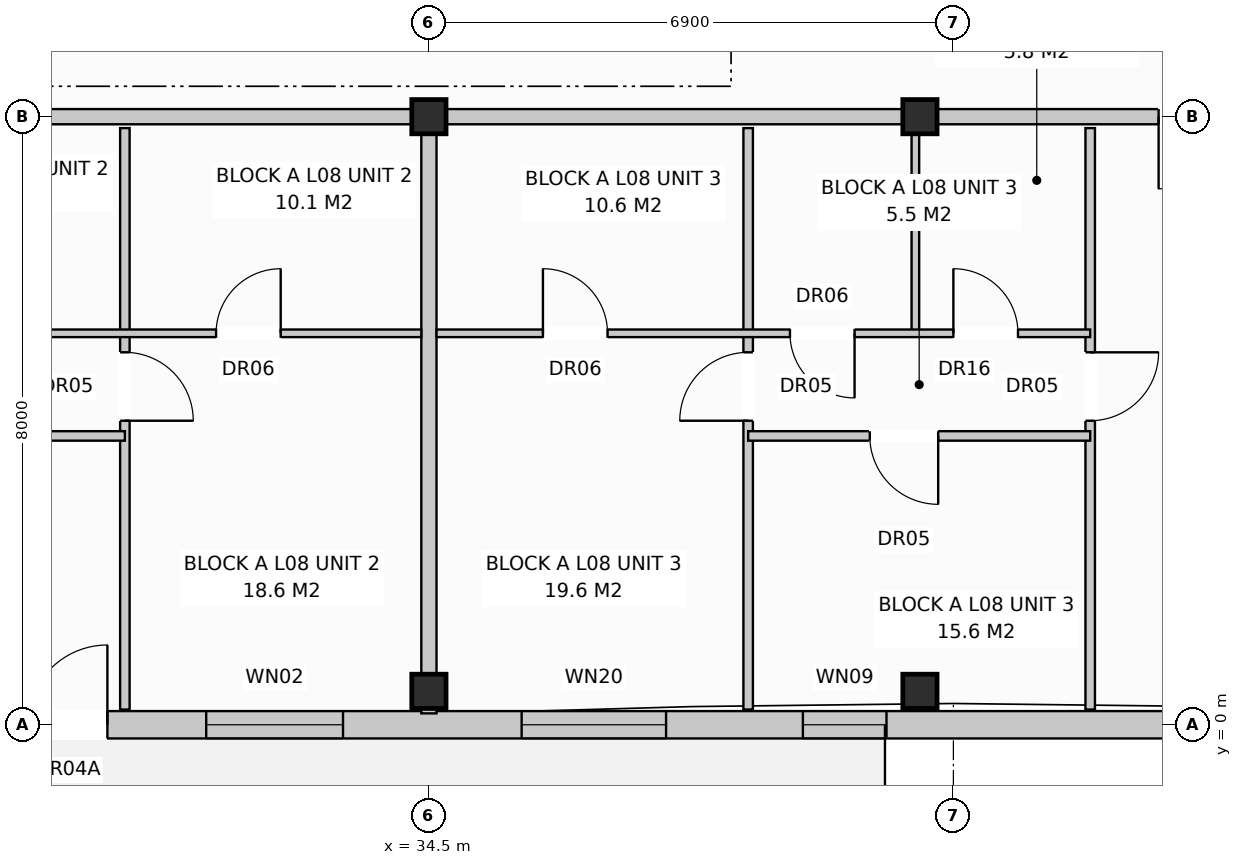
"""IFC4 building model, lengths in metres.
Left out: names, types, materials, properties, quantities, classifications, styles, units other than length and angle.
Written with IfcOpenShell. Run it as: python <this file> out.ifc"""

import sys

from ifc_helpers import new_model, si_unit, direction, frame, frame_2d, origin, origin_with_axes, origin_2d, place, context, subcontext, project, spatial, rectangle, extrude, element, fill, save


model = new_model("IFC4")
c1 = context("Model", 3, precision=1e-05, world=origin(), true_north=direction((0.0, 1.0)))
c2 = subcontext(c1, "Body", "Model", "MODEL_VIEW")
j1 = project(units=[si_unit("LENGTHUNIT", "METRE"), si_unit("PLANEANGLEUNIT", "RADIAN")], contexts=[c1])
p1 = place(None, origin())
s1 = spatial("IfcSite", under=j1, at=p1, CompositionType="ELEMENT")
p2 = place(p1, origin())
s2 = spatial("IfcBuilding", under=s1, at=p2, CompositionType="ELEMENT")
p3 = place(p2, frame((0.0, 0.0, 27.2)))
s3 = spatial("IfcBuildingStorey", under=s2, at=p3, CompositionType="ELEMENT", Elevation=27.2)
for number, where, z_axis, x_axis in (
    (1, (34.5, 0.44, 0.0), (0.0, 0.0, 1.0), (1.0, 0.0, 0.0)),
    (2, (34.5, 8.0, 0.0), (0.0, 0.0, 1.0), (1.0, 0.0, 0.0)),
    (3, (40.96, 0.44, 0.0), (0.0, 0.0, 1.0), (1.0, 0.0, 0.0)),
    (4, (40.96, 8.0, 0.0), (0.0, 0.0, 1.0), (1.0, 0.0, 0.0)),
):
    element("IfcColumn", number, at=place(p3, frame(where, z_axis=z_axis, x_axis=x_axis)), inside=s3, PredefinedType="COLUMN", context=c2, shape_type="SweptSolid", body=[
        extrude(rectangle(XDim=0.45, YDim=0.45, at=origin_2d()), origin(), (0.0, 0.0, 1.0), 3.2),
    ])
p4 = place(p3, frame((0.17, 0.0, 0.0), z_axis=(0.0, 0.0, 1.0), x_axis=(1.0, 0.0, 0.0)))
e5 = element("IfcWall", 5, at=p4, inside=s3, PredefinedType="STANDARD", context=c2, shape_type="SweptSolid", body=[
    extrude(rectangle(XDim=54.86, YDim=0.36, at=frame_2d((27.43, 0.0))), origin(), (0.0, 0.0, 1.0), 2.96),
])
p5 = place(p4, frame((3.75, 0.0, 0.0)))
e6 = element("IfcOpeningElement", 6, at=p5, cuts=e5, PredefinedType="OPENING", context=c2, shape_type="SweptSolid", body=[
    extrude(rectangle(XDim=1.05, YDim=2.12, at=frame_2d((0.525, 1.06))), frame((0.0, 0.192, 0.0), z_axis=(0.0, -1.0, 0.0), x_axis=(1.0, 0.0, 0.0)), (0.0, 0.0, 1.0), 0.384),
])
p6 = place(p4, frame((18.65, 0.0, 0.0)))
e7 = element("IfcOpeningElement", 7, at=p6, cuts=e5, PredefinedType="OPENING", context=c2, shape_type="SweptSolid", body=[
    extrude(rectangle(XDim=1.05, YDim=2.12, at=frame_2d((0.525, 1.06))), frame((0.0, 0.192, 0.0), z_axis=(0.0, -1.0, 0.0), x_axis=(1.0, 0.0, 0.0)), (0.0, 0.0, 1.0), 0.384),
])
p7 = place(p4, frame((29.05, 0.0, 0.0)))
e8 = element("IfcOpeningElement", 8, at=p7, cuts=e5, PredefinedType="OPENING", context=c2, shape_type="SweptSolid", body=[
    extrude(rectangle(XDim=1.05, YDim=2.12, at=frame_2d((0.525, 1.06))), frame((0.0, 0.192, 0.0), z_axis=(0.0, -1.0, 0.0), x_axis=(1.0, 0.0, 0.0)), (0.0, 0.0, 1.0), 0.384),
])
p8 = place(p4, frame((46.447, 0.0, 0.0)))
e9 = element("IfcOpeningElement", 9, at=p8, cuts=e5, PredefinedType="OPENING", context=c2, shape_type="SweptSolid", body=[
    extrude(rectangle(XDim=1.05, YDim=2.12, at=frame_2d((0.525, 1.06))), frame((0.0, 0.192, 0.0), z_axis=(0.0, -1.0, 0.0), x_axis=(1.0, 0.0, 0.0)), (0.0, 0.0, 1.0), 0.384),
])
p9 = place(p4, frame((1.6, 0.0, 0.8)))
e10 = element("IfcOpeningElement", 10, at=p9, cuts=e5, PredefinedType="OPENING", context=c2, shape_type="SweptSolid", body=[
    extrude(rectangle(XDim=1.8, YDim=1.7, at=frame_2d((0.9, 0.85))), frame((0.0, 0.192, 0.0), z_axis=(0.0, -1.0, 0.0), x_axis=(1.0, 0.0, 0.0)), (0.0, 0.0, 1.0), 0.384),
])
p10 = place(p4, frame((7.232, 0.0, 0.72)))
e11 = element("IfcOpeningElement", 11, at=p10, cuts=e5, PredefinedType="OPENING", context=c2, shape_type="SweptSolid", body=[
    extrude(rectangle(XDim=1.9, YDim=1.85, at=frame_2d((0.95, 0.925))), frame((0.0, 0.192, 0.0), z_axis=(0.0, -1.0, 0.0), x_axis=(1.0, 0.0, 0.0)), (0.0, 0.0, 1.0), 0.384),
])
p11 = place(p4, frame((10.85, 0.0, 0.72)))
e12 = element("IfcOpeningElement", 12, at=p11, cuts=e5, PredefinedType="OPENING", context=c2, shape_type="SweptSolid", body=[
    extrude(rectangle(XDim=1.1, YDim=1.5, at=frame_2d((0.55, 0.75))), frame((0.0, 0.192, 0.0), z_axis=(0.0, -1.0, 0.0), x_axis=(1.0, 0.0, 0.0)), (0.0, 0.0, 1.0), 0.384),
])
p12 = place(p4, frame((15.9, 0.0, 0.8)))
e13 = element("IfcOpeningElement", 13, at=p12, cuts=e5, PredefinedType="OPENING", context=c2, shape_type="SweptSolid", body=[
    extrude(rectangle(XDim=1.8, YDim=1.7, at=frame_2d((0.9, 0.85))), frame((0.0, 0.192, 0.0), z_axis=(0.0, -1.0, 0.0), x_axis=(1.0, 0.0, 0.0)), (0.0, 0.0, 1.0), 0.384),
])
p13 = place(p4, frame((21.55, 0.0, 0.72)))
e14 = element("IfcOpeningElement", 14, at=p13, cuts=e5, PredefinedType="OPENING", context=c2, shape_type="SweptSolid", body=[
    extrude(rectangle(XDim=1.9, YDim=1.85, at=frame_2d((0.95, 0.925))), frame((0.0, 0.192, 0.0), z_axis=(0.0, -1.0, 0.0), x_axis=(1.0, 0.0, 0.0)), (0.0, 0.0, 1.0), 0.384),
])
p14 = place(p4, frame((25.6, 0.0, 0.72)))
e15 = element("IfcOpeningElement", 15, at=p14, cuts=e5, PredefinedType="OPENING", context=c2, shape_type="SweptSolid", body=[
    extrude(rectangle(XDim=1.1, YDim=1.5, at=frame_2d((0.55, 0.75))), frame((0.0, 0.192, 0.0), z_axis=(0.0, -1.0, 0.0), x_axis=(1.0, 0.0, 0.0)), (0.0, 0.0, 1.0), 0.384),
])
p15 = place(p4, frame((31.4, 0.0, 0.8)))
e16 = element("IfcOpeningElement", 16, at=p15, cuts=e5, PredefinedType="OPENING", context=c2, shape_type="SweptSolid", body=[
    extrude(rectangle(XDim=1.8, YDim=1.7, at=frame_2d((0.9, 0.85))), frame((0.0, 0.192, 0.0), z_axis=(0.0, -1.0, 0.0), x_axis=(1.0, 0.0, 0.0)), (0.0, 0.0, 1.0), 0.384),
])
p16 = place(p4, frame((35.55, 0.0, 0.72)))
e17 = element("IfcOpeningElement", 17, at=p16, cuts=e5, PredefinedType="OPENING", context=c2, shape_type="SweptSolid", body=[
    extrude(rectangle(XDim=1.9, YDim=1.85, at=frame_2d((0.95, 0.925))), frame((0.0, 0.192, 0.0), z_axis=(0.0, -1.0, 0.0), x_axis=(1.0, 0.0, 0.0)), (0.0, 0.0, 1.0), 0.384),
])
p17 = place(p4, frame((39.25, 0.0, 0.72)))
e18 = element("IfcOpeningElement", 18, at=p17, cuts=e5, PredefinedType="OPENING", context=c2, shape_type="SweptSolid", body=[
    extrude(rectangle(XDim=1.1, YDim=1.5, at=frame_2d((0.55, 0.75))), frame((0.0, 0.192, 0.0), z_axis=(0.0, -1.0, 0.0), x_axis=(1.0, 0.0, 0.0)), (0.0, 0.0, 1.0), 0.384),
])
p18 = place(p4, frame((44.3, 0.0, 0.8)))
e19 = element("IfcOpeningElement", 19, at=p18, cuts=e5, PredefinedType="OPENING", context=c2, shape_type="SweptSolid", body=[
    extrude(rectangle(XDim=1.8, YDim=1.7, at=frame_2d((0.9, 0.85))), frame((0.0, 0.192, 0.0), z_axis=(0.0, -1.0, 0.0), x_axis=(1.0, 0.0, 0.0)), (0.0, 0.0, 1.0), 0.384),
])
p19 = place(p4, frame((49.55, 0.0, 0.72)))
e20 = element("IfcOpeningElement", 20, at=p19, cuts=e5, PredefinedType="OPENING", context=c2, shape_type="SweptSolid", body=[
    extrude(rectangle(XDim=1.1, YDim=1.5, at=frame_2d((0.55, 0.75))), frame((0.0, 0.192, 0.0), z_axis=(0.0, -1.0, 0.0), x_axis=(1.0, 0.0, 0.0)), (0.0, 0.0, 1.0), 0.384),
])
p20 = place(p4, frame((52.29, 0.0, 0.8)))
e21 = element("IfcOpeningElement", 21, at=p20, cuts=e5, PredefinedType="OPENING", context=c2, shape_type="SweptSolid", body=[
    extrude(rectangle(XDim=1.95, YDim=1.65, at=frame_2d((0.975, 0.825))), frame((0.0, 0.192, 0.0), z_axis=(0.0, -1.0, 0.0), x_axis=(1.0, 0.0, 0.0)), (0.0, 0.0, 1.0), 0.384),
])
p21 = place(p3, frame((34.5, 7.85, 0.0), z_axis=(0.0, 0.0, 1.0), x_axis=(0.0, -1.0, 0.0)))
e22 = element("IfcWall", 22, at=p21, inside=s3, PredefinedType="PARTITIONING", context=c2, shape_type="SweptSolid", body=[
    extrude(rectangle(XDim=7.7, YDim=0.2, at=frame_2d((3.85, 0.0))), origin(), (0.0, 0.0, 1.0), 2.4),
])
p22 = place(p3, frame((13.8, 8.0, 0.0), z_axis=(0.0, 0.0, 1.0), x_axis=(1.0, 0.0, 0.0)))
e23 = element("IfcWall", 23, at=p22, inside=s3, PredefinedType="PARTITIONING", context=c2, shape_type="SweptSolid", body=[
    extrude(rectangle(XDim=20.7, YDim=0.2, at=frame_2d((10.35, 0.0))), origin(), (0.0, 0.0, 1.0), 2.4),
])
p23 = place(p22, frame((2.4, 0.0, 0.0)))
e24 = element("IfcOpeningElement", 24, at=p23, cuts=e23, PredefinedType="OPENING", context=c2, shape_type="SweptSolid", body=[
    extrude(rectangle(XDim=0.95, YDim=2.15, at=frame_2d((0.475, 1.075))), frame((0.0, 0.112, 0.0), z_axis=(0.0, -1.0, 0.0), x_axis=(1.0, 0.0, 0.0)), (0.0, 0.0, 1.0), 0.224),
])
p24 = place(p3, frame((30.5, 7.85, 0.0), z_axis=(0.0, 0.0, 1.0), x_axis=(0.0, -1.0, 0.0)))
e25 = element("IfcWall", 25, at=p24, inside=s3, PredefinedType="PARTITIONING", context=c2, shape_type="SweptSolid", body=[
    extrude(rectangle(XDim=7.65, YDim=0.125, at=frame_2d((3.825, 0.0))), origin(), (0.0, 0.0, 1.0), 2.96),
])
p25 = place(p24, frame((2.95, 0.0, 0.0)))
e26 = element("IfcOpeningElement", 26, at=p25, cuts=e25, PredefinedType="OPENING", context=c2, shape_type="SweptSolid", body=[
    extrude(rectangle(XDim=0.9, YDim=2.1, at=frame_2d((0.45, 1.05))), frame((0.0, 0.074, 0.0), z_axis=(0.0, -1.0, 0.0), x_axis=(1.0, 0.0, 0.0)), (0.0, 0.0, 1.0), 0.149),
])
p26 = place(p3, frame((20.1, 5.15, 0.0), z_axis=(0.0, 0.0, 1.0), x_axis=(1.0, 0.0, 0.0)))
e27 = element("IfcWall", 27, at=p26, inside=s3, PredefinedType="PARTITIONING", context=c2, shape_type="SweptSolid", body=[
    extrude(rectangle(XDim=14.3, YDim=0.1, at=frame_2d((7.15, 0.0))), origin(), (0.0, 0.0, 1.0), 2.96),
])
p27 = place(p26, frame((1.6, 0.0, 0.0)))
e28 = element("IfcOpeningElement", 28, at=p27, cuts=e27, PredefinedType="OPENING", context=c2, shape_type="SweptSolid", body=[
    extrude(rectangle(XDim=0.9, YDim=2.1, at=frame_2d((0.45, 1.05))), frame((0.0, 0.062, 0.0), z_axis=(0.0, -1.0, 0.0), x_axis=(1.0, 0.0, 0.0)), (0.0, 0.0, 1.0), 0.124),
])
p28 = place(p26, frame((5.1, 0.0, 0.0)))
e29 = element("IfcOpeningElement", 29, at=p28, cuts=e27, PredefinedType="OPENING", context=c2, shape_type="SweptSolid", body=[
    extrude(rectangle(XDim=0.85, YDim=2.05, at=frame_2d((0.425, 1.025))), frame((0.0, 0.062, 0.0), z_axis=(0.0, -1.0, 0.0), x_axis=(1.0, 0.0, 0.0)), (0.0, 0.0, 1.0), 0.124),
])
p29 = place(p26, frame((8.2, 0.0, 0.0)))
e30 = element("IfcOpeningElement", 30, at=p29, cuts=e27, PredefinedType="OPENING", context=c2, shape_type="SweptSolid", body=[
    extrude(rectangle(XDim=0.85, YDim=2.05, at=frame_2d((0.425, 1.025))), frame((0.0, 0.062, 0.0), z_axis=(0.0, -1.0, 0.0), x_axis=(1.0, 0.0, 0.0)), (0.0, 0.0, 1.0), 0.124),
])
p30 = place(p26, frame((11.6, 0.0, 0.0)))
e31 = element("IfcOpeningElement", 31, at=p30, cuts=e27, PredefinedType="OPENING", context=c2, shape_type="SweptSolid", body=[
    extrude(rectangle(XDim=0.85, YDim=2.05, at=frame_2d((0.425, 1.025))), frame((0.0, 0.062, 0.0), z_axis=(0.0, -1.0, 0.0), x_axis=(1.0, 0.0, 0.0)), (0.0, 0.0, 1.0), 0.124),
])
p31 = place(p3, frame((20.1, 3.8, 0.0), z_axis=(0.0, 0.0, 1.0), x_axis=(1.0, 0.0, 0.0)))
e32 = element("IfcWall", 32, at=p31, inside=s3, PredefinedType="PARTITIONING", context=c2, shape_type="SweptSolid", body=[
    extrude(rectangle(XDim=10.4, YDim=0.125, at=frame_2d((5.2, 0.0))), origin(), (0.0, 0.0, 1.0), 2.96),
])
p32 = place(p31, frame((2.0, 0.0, 0.0)))
e33 = element("IfcOpeningElement", 33, at=p32, cuts=e32, PredefinedType="OPENING", context=c2, shape_type="SweptSolid", body=[
    extrude(rectangle(XDim=0.9, YDim=2.1, at=frame_2d((0.45, 1.05))), frame((0.0, 0.074, 0.0), z_axis=(0.0, -1.0, 0.0), x_axis=(1.0, 0.0, 0.0)), (0.0, 0.0, 1.0), 0.149),
])
p33 = place(p31, frame((7.2, 0.0, 0.0)))
e34 = element("IfcOpeningElement", 34, at=p33, cuts=e32, PredefinedType="OPENING", context=c2, shape_type="SweptSolid", body=[
    extrude(rectangle(XDim=0.9, YDim=2.1, at=frame_2d((0.45, 1.05))), frame((0.0, 0.074, 0.0), z_axis=(0.0, -1.0, 0.0), x_axis=(1.0, 0.0, 0.0)), (0.0, 0.0, 1.0), 0.149),
])
p34 = place(p3, frame((34.5, 8.0, 0.0), z_axis=(0.0, 0.0, 1.0), x_axis=(1.0, 0.0, 0.0)))
e35 = element("IfcWall", 35, at=p34, inside=s3, PredefinedType="PARTITIONING", context=c2, shape_type="SweptSolid", body=[
    extrude(rectangle(XDim=13.8, YDim=0.2, at=frame_2d((6.9, 0.0))), origin(), (0.0, 0.0, 1.0), 2.4),
])
p35 = place(p34, frame((9.6, 0.0, 0.0)))
e36 = element("IfcOpeningElement", 36, at=p35, cuts=e35, PredefinedType="OPENING", context=c2, shape_type="SweptSolid", body=[
    extrude(rectangle(XDim=0.95, YDim=2.15, at=frame_2d((0.475, 1.075))), frame((0.0, 0.112, 0.0), z_axis=(0.0, -1.0, 0.0), x_axis=(1.0, 0.0, 0.0)), (0.0, 0.0, 1.0), 0.224),
])
p36 = place(p3, frame((43.2, 7.85, 0.0), z_axis=(0.0, 0.0, 1.0), x_axis=(0.0, -1.0, 0.0)))
e37 = element("IfcWall", 37, at=p36, inside=s3, PredefinedType="PARTITIONING", context=c2, shape_type="SweptSolid", body=[
    extrude(rectangle(XDim=7.65, YDim=0.125, at=frame_2d((3.825, 0.0))), origin(), (0.0, 0.0, 1.0), 2.96),
])
p37 = place(p36, frame((2.95, 0.0, 0.0)))
e38 = element("IfcOpeningElement", 38, at=p37, cuts=e37, PredefinedType="OPENING", context=c2, shape_type="SweptSolid", body=[
    extrude(rectangle(XDim=0.9, YDim=2.1, at=frame_2d((0.45, 1.05))), frame((0.0, 0.074, 0.0), z_axis=(0.0, -1.0, 0.0), x_axis=(1.0, 0.0, 0.0)), (0.0, 0.0, 1.0), 0.149),
])
p38 = place(p3, frame((38.7, 7.85, 0.0), z_axis=(0.0, 0.0, 1.0), x_axis=(0.0, -1.0, 0.0)))
e39 = element("IfcWall", 39, at=p38, inside=s3, PredefinedType="PARTITIONING", context=c2, shape_type="SweptSolid", body=[
    extrude(rectangle(XDim=7.65, YDim=0.125, at=frame_2d((3.825, 0.0))), origin(), (0.0, 0.0, 1.0), 2.96),
])
p39 = place(p38, frame((2.95, 0.0, 0.0)))
e40 = element("IfcOpeningElement", 40, at=p39, cuts=e39, PredefinedType="OPENING", context=c2, shape_type="SweptSolid", body=[
    extrude(rectangle(XDim=0.9, YDim=2.1, at=frame_2d((0.45, 1.05))), frame((0.0, 0.074, 0.0), z_axis=(0.0, -1.0, 0.0), x_axis=(1.0, 0.0, 0.0)), (0.0, 0.0, 1.0), 0.149),
])
p40 = place(p3, frame((40.9, 7.85, 0.0), z_axis=(0.0, 0.0, 1.0), x_axis=(0.0, -1.0, 0.0)))
e41 = element("IfcWall", 41, at=p40, inside=s3, PredefinedType="PARTITIONING", context=c2, shape_type="SweptSolid", body=[
    extrude(rectangle(XDim=2.7, YDim=0.1, at=frame_2d((1.35, 0.0))), origin(), (0.0, 0.0, 1.0), 2.96),
])
p41 = place(p3, frame((34.6, 5.15, 0.0), z_axis=(0.0, 0.0, 1.0), x_axis=(1.0, 0.0, 0.0)))
e42 = element("IfcWall", 42, at=p41, inside=s3, PredefinedType="PARTITIONING", context=c2, shape_type="SweptSolid", body=[
    extrude(rectangle(XDim=8.6, YDim=0.1, at=frame_2d((4.3, 0.0))), origin(), (0.0, 0.0, 1.0), 2.96),
])
p42 = place(p41, frame((1.4, 0.0, 0.0)))
e43 = element("IfcOpeningElement", 43, at=p42, cuts=e42, PredefinedType="OPENING", context=c2, shape_type="SweptSolid", body=[
    extrude(rectangle(XDim=0.85, YDim=2.05, at=frame_2d((0.425, 1.025))), frame((0.0, 0.062, 0.0), z_axis=(0.0, -1.0, 0.0), x_axis=(1.0, 0.0, 0.0)), (0.0, 0.0, 1.0), 0.124),
])
p43 = place(p41, frame((4.65, 0.0, 0.0)))
e44 = element("IfcOpeningElement", 44, at=p43, cuts=e42, PredefinedType="OPENING", context=c2, shape_type="SweptSolid", body=[
    extrude(rectangle(XDim=0.85, YDim=2.05, at=frame_2d((0.425, 1.025))), frame((0.0, 0.062, 0.0), z_axis=(0.0, -1.0, 0.0), x_axis=(1.0, 0.0, 0.0)), (0.0, 0.0, 1.0), 0.124),
])
p44 = place(p41, frame((6.8, 0.0, 0.0)))
e45 = element("IfcOpeningElement", 45, at=p44, cuts=e42, PredefinedType="OPENING", context=c2, shape_type="SweptSolid", body=[
    extrude(rectangle(XDim=0.85, YDim=2.1, at=frame_2d((0.425, 1.05))), frame((0.0, 0.062, 0.0), z_axis=(0.0, -1.0, 0.0), x_axis=(1.0, 0.0, 0.0)), (0.0, 0.0, 1.0), 0.124),
])
p45 = place(p3, frame((38.7, 3.8, 0.0), z_axis=(0.0, 0.0, 1.0), x_axis=(1.0, 0.0, 0.0)))
e46 = element("IfcWall", 46, at=p45, inside=s3, PredefinedType="PARTITIONING", context=c2, shape_type="SweptSolid", body=[
    extrude(rectangle(XDim=4.5, YDim=0.125, at=frame_2d((2.25, 0.0))), origin(), (0.0, 0.0, 1.0), 2.96),
])
p46 = place(p45, frame((1.6, 0.0, 0.0)))
e47 = element("IfcOpeningElement", 47, at=p46, cuts=e46, PredefinedType="OPENING", context=c2, shape_type="SweptSolid", body=[
    extrude(rectangle(XDim=0.9, YDim=2.1, at=frame_2d((0.45, 1.05))), frame((0.0, 0.074, 0.0), z_axis=(0.0, -1.0, 0.0), x_axis=(1.0, 0.0, 0.0)), (0.0, 0.0, 1.0), 0.149),
])
p47 = place(p7, origin_with_axes())
e48 = element("IfcDoor", 48, at=p47, inside=s3, OperationType="SINGLE_SWING_RIGHT", PredefinedType="DOOR", context=c2, shape_type="SweptSolid", body=[
    extrude(rectangle(XDim=1.05, YDim=2.12, at=frame_2d((0.525, 1.06))), frame((0.0, 0.025, 0.0), z_axis=(0.0, -1.0, 0.0), x_axis=(1.0, 0.0, 0.0)), (0.0, 0.0, 1.0), 0.05),
])
fill(e8, e48)
p48 = place(p15, origin_with_axes())
e49 = element("IfcWindow", 49, at=p48, inside=s3, PartitioningType="SINGLE_PANEL", PredefinedType="WINDOW", context=c2, shape_type="SweptSolid", body=[
    extrude(rectangle(XDim=1.8, YDim=1.7, at=frame_2d((0.9, 0.85))), frame((0.0, 0.03, 0.0), z_axis=(0.0, -1.0, 0.0), x_axis=(1.0, 0.0, 0.0)), (0.0, 0.0, 1.0), 0.06),
])
fill(e16, e49)
p49 = place(p16, origin_with_axes())
e50 = element("IfcWindow", 50, at=p49, inside=s3, PartitioningType="SINGLE_PANEL", PredefinedType="WINDOW", context=c2, shape_type="SweptSolid", body=[
    extrude(rectangle(XDim=1.9, YDim=1.85, at=frame_2d((0.95, 0.925))), frame((0.0, 0.03, 0.0), z_axis=(0.0, -1.0, 0.0), x_axis=(1.0, 0.0, 0.0)), (0.0, 0.0, 1.0), 0.06),
])
fill(e17, e50)
p50 = place(p17, origin_with_axes())
e51 = element("IfcWindow", 51, at=p50, inside=s3, PartitioningType="SINGLE_PANEL", PredefinedType="WINDOW", context=c2, shape_type="SweptSolid", body=[
    extrude(rectangle(XDim=1.1, YDim=1.5, at=frame_2d((0.55, 0.75))), frame((0.0, 0.03, 0.0), z_axis=(0.0, -1.0, 0.0), x_axis=(1.0, 0.0, 0.0)), (0.0, 0.0, 1.0), 0.06),
])
fill(e18, e51)
p51 = place(p25, origin_with_axes())
e52 = element("IfcDoor", 52, at=p51, inside=s3, OperationType="SINGLE_SWING_RIGHT", PredefinedType="DOOR", context=c2, shape_type="SweptSolid", body=[
    extrude(rectangle(XDim=0.9, YDim=2.1, at=frame_2d((0.45, 1.05))), frame((0.0, 0.025, 0.0), z_axis=(0.0, -1.0, 0.0), x_axis=(1.0, 0.0, 0.0)), (0.0, 0.0, 1.0), 0.05),
])
fill(e26, e52)
p52 = place(p30, origin_with_axes())
e53 = element("IfcDoor", 53, at=p52, inside=s3, OperationType="SINGLE_SWING_RIGHT", PredefinedType="DOOR", context=c2, shape_type="SweptSolid", body=[
    extrude(rectangle(XDim=0.85, YDim=2.05, at=frame_2d((0.425, 1.025))), frame((0.0, 0.025, 0.0), z_axis=(0.0, -1.0, 0.0), x_axis=(1.0, 0.0, 0.0)), (0.0, 0.0, 1.0), 0.05),
])
fill(e31, e53)
p53 = place(p35, frame((0.95, 0.0, 0.0), z_axis=(0.0, 0.0, 1.0), x_axis=(-1.0, 0.0, 0.0)))
e54 = element("IfcDoor", 54, at=p53, inside=s3, OperationType="SINGLE_SWING_LEFT", PredefinedType="DOOR", context=c2, shape_type="SweptSolid", body=[
    extrude(rectangle(XDim=0.95, YDim=2.15, at=frame_2d((0.475, 1.075))), frame((0.0, 0.025, 0.0), z_axis=(0.0, -1.0, 0.0), x_axis=(1.0, 0.0, 0.0)), (0.0, 0.0, 1.0), 0.05),
])
fill(e36, e54)
p54 = place(p37, origin_with_axes())
e55 = element("IfcDoor", 55, at=p54, inside=s3, OperationType="SINGLE_SWING_LEFT", PredefinedType="DOOR", context=c2, shape_type="SweptSolid", body=[
    extrude(rectangle(XDim=0.9, YDim=2.1, at=frame_2d((0.45, 1.05))), frame((0.0, 0.025, 0.0), z_axis=(0.0, -1.0, 0.0), x_axis=(1.0, 0.0, 0.0)), (0.0, 0.0, 1.0), 0.05),
])
fill(e38, e55)
p55 = place(p39, frame((0.9, 0.0, 0.0), z_axis=(0.0, 0.0, 1.0), x_axis=(-1.0, 0.0, 0.0)))
e56 = element("IfcDoor", 56, at=p55, inside=s3, OperationType="SINGLE_SWING_RIGHT", PredefinedType="DOOR", context=c2, shape_type="SweptSolid", body=[
    extrude(rectangle(XDim=0.9, YDim=2.1, at=frame_2d((0.45, 1.05))), frame((0.0, 0.025, 0.0), z_axis=(0.0, -1.0, 0.0), x_axis=(1.0, 0.0, 0.0)), (0.0, 0.0, 1.0), 0.05),
])
fill(e40, e56)
p56 = place(p42, origin_with_axes())
e57 = element("IfcDoor", 57, at=p56, inside=s3, OperationType="SINGLE_SWING_LEFT", PredefinedType="DOOR", context=c2, shape_type="SweptSolid", body=[
    extrude(rectangle(XDim=0.85, YDim=2.05, at=frame_2d((0.425, 1.025))), frame((0.0, 0.025, 0.0), z_axis=(0.0, -1.0, 0.0), x_axis=(1.0, 0.0, 0.0)), (0.0, 0.0, 1.0), 0.05),
])
fill(e43, e57)
p57 = place(p43, frame((0.85, 0.0, 0.0), z_axis=(0.0, 0.0, 1.0), x_axis=(-1.0, 0.0, 0.0)))
e58 = element("IfcDoor", 58, at=p57, inside=s3, OperationType="SINGLE_SWING_RIGHT", PredefinedType="DOOR", context=c2, shape_type="SweptSolid", body=[
    extrude(rectangle(XDim=0.85, YDim=2.05, at=frame_2d((0.425, 1.025))), frame((0.0, 0.025, 0.0), z_axis=(0.0, -1.0, 0.0), x_axis=(1.0, 0.0, 0.0)), (0.0, 0.0, 1.0), 0.05),
])
fill(e44, e58)
p58 = place(p44, origin_with_axes())
e59 = element("IfcDoor", 59, at=p58, inside=s3, OperationType="SINGLE_SWING_LEFT", PredefinedType="DOOR", context=c2, shape_type="SweptSolid", body=[
    extrude(rectangle(XDim=0.85, YDim=2.1, at=frame_2d((0.425, 1.05))), frame((0.0, 0.025, 0.0), z_axis=(0.0, -1.0, 0.0), x_axis=(1.0, 0.0, 0.0)), (0.0, 0.0, 1.0), 0.05),
])
fill(e45, e59)
p59 = place(p46, frame((0.9, 0.0, 0.0), z_axis=(0.0, 0.0, 1.0), x_axis=(-1.0, 0.0, 0.0)))
e60 = element("IfcDoor", 60, at=p59, inside=s3, OperationType="SINGLE_SWING_RIGHT", PredefinedType="DOOR", context=c2, shape_type="SweptSolid", body=[
    extrude(rectangle(XDim=0.9, YDim=2.1, at=frame_2d((0.45, 1.05))), frame((0.0, 0.025, 0.0), z_axis=(0.0, -1.0, 0.0), x_axis=(1.0, 0.0, 0.0)), (0.0, 0.0, 1.0), 0.05),
])
fill(e47, e60)
save(model, sys.argv[1])
